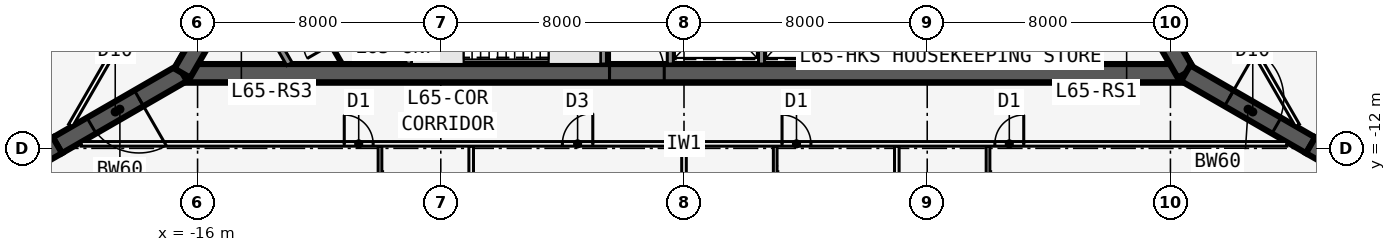
"""IFC4 building model, lengths in metres.
Left out: names, types, materials, properties, quantities, classifications, styles, units other than length and angle.
Written with IfcOpenShell. Run it as: python <this file> out.ifc"""

import sys

from ifc_helpers import new_model, si_unit, direction, frame, frame_2d, origin, place, context, subcontext, project, spatial, polyline, rectangle, outline, extrude, element, fill, save


model = new_model("IFC4")
c1 = context("Model", 3, precision=1e-05, world=origin(), true_north=direction((0.0, 1.0)))
c2 = subcontext(c1, "Body", "Model", "MODEL_VIEW")
j1 = project(units=[si_unit("LENGTHUNIT", "METRE"), si_unit("PLANEANGLEUNIT", "RADIAN")], contexts=[c1])
p1 = place(None, origin())
s1 = spatial("IfcSite", under=j1, at=p1, CompositionType="ELEMENT")
p2 = place(p1, origin())
s2 = spatial("IfcBuilding", under=s1, at=p2, CompositionType="ELEMENT")
p3 = place(p2, frame((0.0, 0.0, 246.5)))
s3 = spatial("IfcBuildingStorey", under=s2, at=p3, CompositionType="ELEMENT", Elevation=246.5)
p4 = place(p3, frame((-16.5, -9.526, 0.0), z_axis=(0.0, 0.0, 1.0), x_axis=(1.0, 0.0, 0.0)))
e1 = element("IfcWall", 1, at=p4, inside=s3, PredefinedType="SHEAR", context=c2, shape_type="SweptSolid", body=[
    extrude(rectangle(XDim=33.0, YDim=0.6, at=frame_2d((16.5, 0.0))), origin(), (0.0, 0.0, 1.0), 3.6),
])
p5 = place(p4, frame((14.05, 0.0, 0.0)))
e2 = element("IfcOpeningElement", 2, at=p5, cuts=e1, PredefinedType="OPENING", context=c2, shape_type="SweptSolid", body=[
    extrude(rectangle(XDim=1.8, YDim=2.13, at=frame_2d((0.9, 1.065))), frame((0.0, 0.31, 0.0), z_axis=(0.0, -1.0, 0.0), x_axis=(1.0, 0.0, 0.0)), (0.0, 0.0, 1.0), 0.62),
])
p6 = place(p3, frame((-9.05, -5.951, 0.0), z_axis=(0.0, 0.0, 1.0), x_axis=(0.0, -1.0, 0.0)))
e3 = element("IfcWall", 3, at=p6, inside=s3, PredefinedType="SOLIDWALL", context=c2, shape_type="SweptSolid", body=[
    extrude(rectangle(XDim=3.275, YDim=0.2, at=frame_2d((1.637, 0.0))), origin(), (0.0, 0.0, 1.0), 3.435),
])
p7 = place(p3, frame((-2.65, -5.951, 0.0), z_axis=(0.0, 0.0, 1.0), x_axis=(0.0, -1.0, 0.0)))
e4 = element("IfcWall", 4, at=p7, inside=s3, PredefinedType="SOLIDWALL", context=c2, shape_type="SweptSolid", body=[
    extrude(rectangle(XDim=3.275, YDim=0.2, at=frame_2d((1.637, 0.0))), origin(), (0.0, 0.0, 1.0), 3.435),
])
p8 = place(p7, frame((1.675, 0.0, 0.0)))
e5 = element("IfcOpeningElement", 5, at=p8, cuts=e4, PredefinedType="OPENING", context=c2, shape_type="SweptSolid", body=[
    extrude(rectangle(XDim=1.0, YDim=2.13, at=frame_2d((0.5, 1.065))), frame((0.0, 0.11, 0.0), z_axis=(0.0, -1.0, 0.0), x_axis=(1.0, 0.0, 0.0)), (0.0, 0.0, 1.0), 0.22),
])
for number, where, z_axis, x_axis in (
    (6, (-0.45, -5.951, 0.0), (0.0, 0.0, 1.0), (0.0, -1.0, 0.0)),
    (7, (2.55, -5.951, 0.0), (0.0, 0.0, 1.0), (0.0, -1.0, 0.0)),
    (8, (5.55, -5.951, 0.0), (0.0, 0.0, 1.0), (0.0, -1.0, 0.0)),
    (9, (8.45, -5.951, 0.0), (0.0, 0.0, 1.0), (0.0, -1.0, 0.0)),
):
    element("IfcWall", number, at=place(p3, frame(where, z_axis=z_axis, x_axis=x_axis)), inside=s3, PredefinedType="SOLIDWALL", context=c2, shape_type="SweptSolid", body=[
        extrude(rectangle(XDim=3.275, YDim=0.2, at=frame_2d((1.637, 0.0))), origin(), (0.0, 0.0, 1.0), 3.435),
    ])
p9 = place(p3, frame((16.5, -9.526, 0.0), z_axis=(0.0, 0.0, 1.0), x_axis=(-0.499999749417, 0.866025548458, 0.0)))
e10 = element("IfcWall", 10, at=p9, inside=s3, PredefinedType="SHEAR", context=c2, shape_type="SweptSolid", body=[
    extrude(rectangle(XDim=33.0, YDim=0.6, at=frame_2d((16.5, 0.0))), origin(), (0.0, 0.0, 1.0), 3.6),
])
p10 = place(p9, frame((14.15, 0.0, 0.0)))
e11 = element("IfcOpeningElement", 11, at=p10, cuts=e10, PredefinedType="OPENING", context=c2, shape_type="SweptSolid", body=[
    extrude(rectangle(XDim=1.8, YDim=2.13, at=frame_2d((0.9, 1.065))), frame((0.0, 0.31, 0.0), z_axis=(0.0, -1.0, 0.0), x_axis=(1.0, 0.0, 0.0)), (0.0, 0.0, 1.0), 0.62),
])
p11 = place(p9, frame((12.6, 0.0, 0.0)))
e12 = element("IfcOpeningElement", 12, at=p11, cuts=e10, PredefinedType="OPENING", context=c2, shape_type="SweptSolid", body=[
    extrude(rectangle(XDim=1.0, YDim=2.13, at=frame_2d((0.5, 1.065))), frame((0.0, 0.31, 0.0), z_axis=(0.0, -1.0, 0.0), x_axis=(1.0, 0.0, 0.0)), (0.0, 0.0, 1.0), 0.62),
])
p12 = place(p3, frame((0.0, 19.052, 0.0), z_axis=(0.0, 0.0, 1.0), x_axis=(-0.499999749417, -0.866025548458, 0.0)))
e13 = element("IfcWall", 13, at=p12, inside=s3, PredefinedType="SHEAR", context=c2, shape_type="SweptSolid", body=[
    extrude(rectangle(XDim=33.0, YDim=0.6, at=frame_2d((16.5, 0.0))), origin(), (0.0, 0.0, 1.0), 3.6),
])
p13 = place(p12, frame((14.15, 0.0, 0.0)))
e14 = element("IfcOpeningElement", 14, at=p13, cuts=e13, PredefinedType="OPENING", context=c2, shape_type="SweptSolid", body=[
    extrude(rectangle(XDim=1.8, YDim=2.13, at=frame_2d((0.9, 1.065))), frame((0.0, 0.31, 0.0), z_axis=(0.0, -1.0, 0.0), x_axis=(1.0, 0.0, 0.0)), (0.0, 0.0, 1.0), 0.62),
])
p14 = place(p12, frame((12.6, 0.0, 0.0)))
e15 = element("IfcOpeningElement", 15, at=p14, cuts=e13, PredefinedType="OPENING", context=c2, shape_type="SweptSolid", body=[
    extrude(rectangle(XDim=1.0, YDim=2.13, at=frame_2d((0.5, 1.065))), frame((0.0, 0.31, 0.0), z_axis=(0.0, -1.0, 0.0), x_axis=(1.0, 0.0, 0.0)), (0.0, 0.0, 1.0), 0.62),
])
p15 = place(p3, frame((16.5, -9.526, 0.0), z_axis=(0.0, 0.0, 1.0), x_axis=(0.866031398331, -0.499989616998, 0.0)))
e16 = element("IfcWall", 16, at=p15, inside=s3, PredefinedType="SHEAR", context=c2, shape_type="SweptSolid", body=[
    extrude(rectangle(XDim=4.746, YDim=0.6, at=frame_2d((2.373, 0.0))), origin(), (0.0, 0.0, 1.0), 3.6),
])
p16 = place(p15, frame((1.65, 0.0, 0.0)))
e17 = element("IfcOpeningElement", 17, at=p16, cuts=e16, PredefinedType="OPENING", context=c2, shape_type="SweptSolid", body=[
    extrude(rectangle(XDim=1.8, YDim=2.13, at=frame_2d((0.9, 1.065))), frame((0.0, 0.31, 0.0), z_axis=(0.0, -1.0, 0.0), x_axis=(1.0, 0.0, 0.0)), (0.0, 0.0, 1.0), 0.62),
])
p17 = place(p3, frame((20.61, -11.899, 0.0), z_axis=(0.0, 0.0, 1.0), x_axis=(0.866009537788, -0.500027479704, 0.0)))
e18 = element("IfcWall", 18, at=p17, inside=s3, PredefinedType="SHEAR", context=c2, shape_type="SweptSolid", body=[
    extrude(rectangle(XDim=1.155, YDim=0.6, at=frame_2d((0.577, 0.0))), origin(), (0.0, 0.0, 1.0), 3.6),
])
p18 = place(p3, frame((-16.5, -9.526, 0.0), z_axis=(0.0, 0.0, 1.0), x_axis=(-0.866031398331, -0.499989616998, 0.0)))
e19 = element("IfcWall", 19, at=p18, inside=s3, PredefinedType="SHEAR", context=c2, shape_type="SweptSolid", body=[
    extrude(rectangle(XDim=4.746, YDim=0.6, at=frame_2d((2.373, 0.0))), origin(), (0.0, 0.0, 1.0), 3.6),
])
p19 = place(p18, frame((1.65, 0.0, 0.0)))
e20 = element("IfcOpeningElement", 20, at=p19, cuts=e19, PredefinedType="OPENING", context=c2, shape_type="SweptSolid", body=[
    extrude(rectangle(XDim=1.8, YDim=2.13, at=frame_2d((0.9, 1.065))), frame((0.0, 0.31, 0.0), z_axis=(0.0, -1.0, 0.0), x_axis=(1.0, 0.0, 0.0)), (0.0, 0.0, 1.0), 0.62),
])
p20 = place(p3, frame((-20.61, -11.899, 0.0), z_axis=(0.0, 0.0, 1.0), x_axis=(-0.866009537788, -0.500027479704, 0.0)))
e21 = element("IfcWall", 21, at=p20, inside=s3, PredefinedType="SHEAR", context=c2, shape_type="SweptSolid", body=[
    extrude(rectangle(XDim=1.155, YDim=0.6, at=frame_2d((0.577, 0.0))), origin(), (0.0, 0.0, 1.0), 3.6),
])
p21 = place(p3, frame((18.46, -15.924, 0.0), z_axis=(0.0, 0.0, 1.0), x_axis=(0.707081252484, 0.707132308968, 0.0)))
e22 = element("IfcWall", 22, at=p21, inside=s3, PredefinedType="SOLIDWALL", context=c2, shape_type="SweptSolid", body=[
    extrude(outline(polyline([(4.782, 0.225), (4.723, 0.225), (4.375, 0.132), (4.351, 0.225), (0.0, 0.225), (0.0, -0.225), (4.782, -0.225), (4.782, 0.225)])), origin(), (0.0, 0.0, 1.0), 3.435),
])
p22 = place(p21, frame((0.75, 0.0, 0.45)))
e23 = element("IfcOpeningElement", 23, at=p22, cuts=e22, PredefinedType="OPENING", context=c2, shape_type="SweptSolid", body=[
    extrude(rectangle(XDim=3.0, YDim=2.6, at=frame_2d((1.5, 1.3))), frame((0.0, 0.235, 0.0), z_axis=(0.0, -1.0, 0.0), x_axis=(1.0, 0.0, 0.0)), (0.0, 0.0, 1.0), 0.47),
])
p23 = place(p3, frame((-21.841, -12.542, 0.0), z_axis=(0.0, 0.0, 1.0), x_axis=(0.707081252484, -0.707132308968, 0.0)))
e24 = element("IfcWall", 24, at=p23, inside=s3, PredefinedType="SOLIDWALL", context=c2, shape_type="SweptSolid", body=[
    extrude(outline(polyline([(4.782, 0.225), (0.431, 0.225), (0.406, 0.132), (0.059, 0.225), (0.0, 0.225), (0.0, -0.225), (4.782, -0.225), (4.782, 0.225)])), origin(), (0.0, 0.0, 1.0), 3.435),
])
p24 = place(p23, frame((1.031, 0.0, 0.45)))
e25 = element("IfcOpeningElement", 25, at=p24, cuts=e24, PredefinedType="OPENING", context=c2, shape_type="SweptSolid", body=[
    extrude(rectangle(XDim=3.0, YDim=2.6, at=frame_2d((1.5, 1.3))), frame((0.0, 0.235, 0.0), z_axis=(0.0, -1.0, 0.0), x_axis=(1.0, 0.0, 0.0)), (0.0, 0.0, 1.0), 0.47),
])
p25 = place(p3, frame((-19.827, -11.851, 0.0), z_axis=(0.0, 0.0, 1.0), x_axis=(1.0, 0.0, 0.0)))
e26 = element("IfcWall", 26, at=p25, inside=s3, PredefinedType="PARTITIONING", context=c2, shape_type="SweptSolid", body=[
    extrude(rectangle(XDim=39.654, YDim=0.15, at=frame_2d((19.827, 0.0))), origin(), (0.0, 0.0, 1.0), 3.435),
])
p26 = place(p25, frame((8.652, 0.0, 0.0)))
e27 = element("IfcOpeningElement", 27, at=p26, cuts=e26, PredefinedType="OPENING", context=c2, shape_type="SweptSolid", body=[
    extrude(rectangle(XDim=0.95, YDim=2.13, at=frame_2d((0.475, 1.065))), frame((0.0, 0.085, 0.0), z_axis=(0.0, -1.0, 0.0), x_axis=(1.0, 0.0, 0.0)), (0.0, 0.0, 1.0), 0.17),
])
p27 = place(p25, frame((15.827, 0.0, 0.0)))
e28 = element("IfcOpeningElement", 28, at=p27, cuts=e26, PredefinedType="OPENING", context=c2, shape_type="SweptSolid", body=[
    extrude(rectangle(XDim=1.0, YDim=2.13, at=frame_2d((0.5, 1.065))), frame((0.0, 0.085, 0.0), z_axis=(0.0, -1.0, 0.0), x_axis=(1.0, 0.0, 0.0)), (0.0, 0.0, 1.0), 0.17),
])
p28 = place(p25, frame((23.052, 0.0, 0.0)))
e29 = element("IfcOpeningElement", 29, at=p28, cuts=e26, PredefinedType="OPENING", context=c2, shape_type="SweptSolid", body=[
    extrude(rectangle(XDim=0.95, YDim=2.13, at=frame_2d((0.475, 1.065))), frame((0.0, 0.085, 0.0), z_axis=(0.0, -1.0, 0.0), x_axis=(1.0, 0.0, 0.0)), (0.0, 0.0, 1.0), 0.17),
])
p29 = place(p25, frame((30.052, 0.0, 0.0)))
e30 = element("IfcOpeningElement", 30, at=p29, cuts=e26, PredefinedType="OPENING", context=c2, shape_type="SweptSolid", body=[
    extrude(rectangle(XDim=0.95, YDim=2.13, at=frame_2d((0.475, 1.065))), frame((0.0, 0.085, 0.0), z_axis=(0.0, -1.0, 0.0), x_axis=(1.0, 0.0, 0.0)), (0.0, 0.0, 1.0), 0.17),
])
p30 = place(p3, frame((-7.0, -11.926, 0.0), z_axis=(0.0, 0.0, 1.0), x_axis=(0.0, -1.0, 0.0)))
e31 = element("IfcWall", 31, at=p30, inside=s3, PredefinedType="PARTITIONING", context=c2, shape_type="SweptSolid", body=[
    extrude(rectangle(XDim=6.609, YDim=0.15, at=frame_2d((3.304, 0.0))), origin(), (0.0, 0.0, 1.0), 2.678),
])
p31 = place(p3, frame((0.0, -11.926, 0.0), z_axis=(0.0, 0.0, 1.0), x_axis=(0.0, -1.0, 0.0)))
e32 = element("IfcWall", 32, at=p31, inside=s3, PredefinedType="PARTITIONING", context=c2, shape_type="SweptSolid", body=[
    extrude(rectangle(XDim=6.854, YDim=0.15, at=frame_2d((3.427, 0.0))), origin(), (0.0, 0.0, 1.0), 2.678),
])
p32 = place(p3, frame((7.0, -11.926, 0.0), z_axis=(0.0, 0.0, 1.0), x_axis=(0.0, -1.0, 0.0)))
e33 = element("IfcWall", 33, at=p32, inside=s3, PredefinedType="PARTITIONING", context=c2, shape_type="SweptSolid", body=[
    extrude(rectangle(XDim=6.609, YDim=0.15, at=frame_2d((3.304, 0.0))), origin(), (0.0, 0.0, 1.0), 2.678),
])
p33 = place(p3, frame((-10.0, -11.926, 0.0), z_axis=(0.0, 0.0, 1.0), x_axis=(0.0, -1.0, 0.0)))
e34 = element("IfcWall", 34, at=p33, inside=s3, PredefinedType="PLUMBINGWALL", context=c2, shape_type="SweptSolid", body=[
    extrude(rectangle(XDim=2.74, YDim=0.12, at=frame_2d((1.37, 0.0))), origin(), (0.0, 0.0, 1.0), 3.435),
])
p34 = place(p33, frame((1.55, 0.0, 0.0)))
e35 = element("IfcOpeningElement", 35, at=p34, cuts=e34, PredefinedType="OPENING", context=c2, shape_type="SweptSolid", body=[
    extrude(rectangle(XDim=0.9, YDim=2.13, at=frame_2d((0.45, 1.065))), frame((0.0, 0.07, 0.0), z_axis=(0.0, -1.0, 0.0), x_axis=(1.0, 0.0, 0.0)), (0.0, 0.0, 1.0), 0.14),
])
p35 = place(p3, frame((3.0, -11.926, 0.0), z_axis=(0.0, 0.0, 1.0), x_axis=(0.0, -1.0, 0.0)))
e36 = element("IfcWall", 36, at=p35, inside=s3, PredefinedType="PLUMBINGWALL", context=c2, shape_type="SweptSolid", body=[
    extrude(rectangle(XDim=2.74, YDim=0.12, at=frame_2d((1.37, 0.0))), origin(), (0.0, 0.0, 1.0), 3.435),
])
p36 = place(p35, frame((1.55, 0.0, 0.0)))
e37 = element("IfcOpeningElement", 37, at=p36, cuts=e36, PredefinedType="OPENING", context=c2, shape_type="SweptSolid", body=[
    extrude(rectangle(XDim=0.9, YDim=2.13, at=frame_2d((0.45, 1.065))), frame((0.0, 0.07, 0.0), z_axis=(0.0, -1.0, 0.0), x_axis=(1.0, 0.0, 0.0)), (0.0, 0.0, 1.0), 0.14),
])
p37 = place(p3, frame((10.0, -11.926, 0.0), z_axis=(0.0, 0.0, 1.0), x_axis=(0.0, -1.0, 0.0)))
e38 = element("IfcWall", 38, at=p37, inside=s3, PredefinedType="PLUMBINGWALL", context=c2, shape_type="SweptSolid", body=[
    extrude(rectangle(XDim=2.74, YDim=0.12, at=frame_2d((1.37, 0.0))), origin(), (0.0, 0.0, 1.0), 3.435),
])
p38 = place(p37, frame((1.55, 0.0, 0.0)))
e39 = element("IfcOpeningElement", 39, at=p38, cuts=e38, PredefinedType="OPENING", context=c2, shape_type="SweptSolid", body=[
    extrude(rectangle(XDim=0.9, YDim=2.13, at=frame_2d((0.45, 1.065))), frame((0.0, 0.07, 0.0), z_axis=(0.0, -1.0, 0.0), x_axis=(1.0, 0.0, 0.0)), (0.0, 0.0, 1.0), 0.14),
])
p39 = place(p3, frame((20.177, -11.245, 0.0), z_axis=(0.0, 0.0, 1.0), x_axis=(-0.49999979161, 0.866025524098, 0.0)))
e40 = element("IfcWall", 40, at=p39, inside=s3, PredefinedType="PARTITIONING", context=c2, shape_type="SweptSolid", body=[
    extrude(rectangle(XDim=12.827, YDim=0.15, at=frame_2d((6.414, 0.0))), origin(), (0.0, 0.0, 1.0), 3.435),
])
p40 = place(p39, frame((8.652, 0.0, 0.0)))
e41 = element("IfcOpeningElement", 41, at=p40, cuts=e40, PredefinedType="OPENING", context=c2, shape_type="SweptSolid", body=[
    extrude(rectangle(XDim=0.95, YDim=2.13, at=frame_2d((0.475, 1.065))), frame((0.0, 0.085, 0.0), z_axis=(0.0, -1.0, 0.0), x_axis=(1.0, 0.0, 0.0)), (0.0, 0.0, 1.0), 0.17),
])
p41 = place(p3, frame((-0.35, 23.096, 0.0), z_axis=(0.0, 0.0, 1.0), x_axis=(-0.499998875317, -0.866026053119, 0.0)))
e42 = element("IfcWall", 42, at=p41, inside=s3, PredefinedType="PARTITIONING", context=c2, shape_type="SweptSolid", body=[
    extrude(rectangle(XDim=39.654, YDim=0.15, at=frame_2d((19.827, 0.0))), origin(), (0.0, 0.0, 1.0), 3.435),
])
p42 = place(p41, frame((8.652, 0.0, 0.0)))
e43 = element("IfcOpeningElement", 43, at=p42, cuts=e42, PredefinedType="OPENING", context=c2, shape_type="SweptSolid", body=[
    extrude(rectangle(XDim=0.95, YDim=2.13, at=frame_2d((0.475, 1.065))), frame((0.0, 0.085, 0.0), z_axis=(0.0, -1.0, 0.0), x_axis=(1.0, 0.0, 0.0)), (0.0, 0.0, 1.0), 0.17),
])
p43 = place(p41, frame((16.052, 0.0, 0.0)))
e44 = element("IfcOpeningElement", 44, at=p43, cuts=e42, PredefinedType="OPENING", context=c2, shape_type="SweptSolid", body=[
    extrude(rectangle(XDim=0.95, YDim=2.13, at=frame_2d((0.475, 1.065))), frame((0.0, 0.085, 0.0), z_axis=(0.0, -1.0, 0.0), x_axis=(1.0, 0.0, 0.0)), (0.0, 0.0, 1.0), 0.17),
])
p44 = place(p41, frame((23.052, 0.0, 0.0)))
e45 = element("IfcOpeningElement", 45, at=p44, cuts=e42, PredefinedType="OPENING", context=c2, shape_type="SweptSolid", body=[
    extrude(rectangle(XDim=0.95, YDim=2.13, at=frame_2d((0.475, 1.065))), frame((0.0, 0.085, 0.0), z_axis=(0.0, -1.0, 0.0), x_axis=(1.0, 0.0, 0.0)), (0.0, 0.0, 1.0), 0.17),
])
p45 = place(p41, frame((30.052, 0.0, 0.0)))
e46 = element("IfcOpeningElement", 46, at=p45, cuts=e42, PredefinedType="OPENING", context=c2, shape_type="SweptSolid", body=[
    extrude(rectangle(XDim=0.95, YDim=2.13, at=frame_2d((0.475, 1.065))), frame((0.0, 0.085, 0.0), z_axis=(0.0, -1.0, 0.0), x_axis=(1.0, 0.0, 0.0)), (0.0, 0.0, 1.0), 0.17),
])
p46 = place(p3, frame((14.479, -6.626, 0.0), z_axis=(0.0, 0.0, 1.0), x_axis=(-0.499952404951, -0.866052881055, 0.0)))
e47 = element("IfcWall", 47, at=p46, inside=s3, PredefinedType="SOLIDWALL", context=c2, shape_type="SweptSolid", body=[
    extrude(rectangle(XDim=3.002, YDim=0.2, at=frame_2d((1.501, 0.0))), origin(), (0.0, 0.0, 1.0), 3.435),
])
p47 = place(p3, frame((13.094, -4.226, 0.0), z_axis=(0.0, 0.0, 1.0), x_axis=(-0.500027479704, -0.866009537788, 0.0)))
e48 = element("IfcWall", 48, at=p47, inside=s3, PredefinedType="PARTITIONING", context=c2, shape_type="SweptSolid", body=[
    extrude(rectangle(XDim=5.774, YDim=0.1, at=frame_2d((2.887, 0.0))), origin(), (0.0, 0.0, 1.0), 3.435),
])
p48 = place(p47, frame((2.437, 0.0, 0.0)))
e49 = element("IfcOpeningElement", 49, at=p48, cuts=e48, PredefinedType="OPENING", context=c2, shape_type="SweptSolid", body=[
    extrude(rectangle(XDim=0.9, YDim=2.13, at=frame_2d((0.45, 1.065))), frame((0.0, 0.06, 0.0), z_axis=(0.0, -1.0, 0.0), x_axis=(1.0, 0.0, 0.0)), (0.0, 0.0, 1.0), 0.12),
])
p49 = place(p3, frame((-12.978, -9.226, 0.0), z_axis=(0.0, 0.0, 1.0), x_axis=(-0.499952404951, 0.866052881055, 0.0)))
e50 = element("IfcWall", 50, at=p49, inside=s3, PredefinedType="SOLIDWALL", context=c2, shape_type="SweptSolid", body=[
    extrude(rectangle(XDim=3.002, YDim=0.2, at=frame_2d((1.501, 0.0))), origin(), (0.0, 0.0, 1.0), 3.435),
])
p50 = place(p3, frame((-11.246, -9.226, 0.0), z_axis=(0.0, 0.0, 1.0), x_axis=(-0.499999210213, 0.866025859768, 0.0)))
e51 = element("IfcWall", 51, at=p50, inside=s3, PredefinedType="PARTITIONING", context=c2, shape_type="SweptSolid", body=[
    extrude(rectangle(XDim=4.734, YDim=0.1, at=frame_2d((2.367, 0.0))), origin(), (0.0, 0.0, 1.0), 3.435),
])
p51 = place(p50, frame((0.734, 0.0, 0.0)))
e52 = element("IfcOpeningElement", 52, at=p51, cuts=e51, PredefinedType="OPENING", context=c2, shape_type="SweptSolid", body=[
    extrude(rectangle(XDim=0.9, YDim=2.13, at=frame_2d((0.45, 1.065))), frame((0.0, 0.06, 0.0), z_axis=(0.0, -1.0, 0.0), x_axis=(1.0, 0.0, 0.0)), (0.0, 0.0, 1.0), 0.12),
])
p52 = place(p26, origin())
e53 = element("IfcDoor", 53, at=p52, inside=s3, OperationType="SINGLE_SWING_LEFT", PredefinedType="DOOR", context=c2, shape_type="SweptSolid", body=[
    extrude(rectangle(XDim=0.95, YDim=2.13, at=frame_2d((0.475, 1.065))), frame((0.0, 0.025, 0.0), z_axis=(0.0, -1.0, 0.0), x_axis=(1.0, 0.0, 0.0)), (0.0, 0.0, 1.0), 0.05),
])
fill(e27, e53)
p53 = place(p27, origin())
e54 = element("IfcDoor", 54, at=p53, inside=s3, OperationType="SINGLE_SWING_RIGHT", PredefinedType="DOOR", context=c2, shape_type="SweptSolid", body=[
    extrude(rectangle(XDim=1.0, YDim=2.13, at=frame_2d((0.5, 1.065))), frame((0.0, 0.025, 0.0), z_axis=(0.0, -1.0, 0.0), x_axis=(1.0, 0.0, 0.0)), (0.0, 0.0, 1.0), 0.05),
])
fill(e28, e54)
p54 = place(p28, origin())
e55 = element("IfcDoor", 55, at=p54, inside=s3, OperationType="SINGLE_SWING_LEFT", PredefinedType="DOOR", context=c2, shape_type="SweptSolid", body=[
    extrude(rectangle(XDim=0.95, YDim=2.13, at=frame_2d((0.475, 1.065))), frame((0.0, 0.025, 0.0), z_axis=(0.0, -1.0, 0.0), x_axis=(1.0, 0.0, 0.0)), (0.0, 0.0, 1.0), 0.05),
])
fill(e29, e55)
p55 = place(p29, origin())
e56 = element("IfcDoor", 56, at=p55, inside=s3, OperationType="SINGLE_SWING_RIGHT", PredefinedType="DOOR", context=c2, shape_type="SweptSolid", body=[
    extrude(rectangle(XDim=0.95, YDim=2.13, at=frame_2d((0.475, 1.065))), frame((0.0, 0.025, 0.0), z_axis=(0.0, -1.0, 0.0), x_axis=(1.0, 0.0, 0.0)), (0.0, 0.0, 1.0), 0.05),
])
fill(e30, e56)
p56 = place(p5, origin())
e57 = element("IfcDoor", 57, at=p56, inside=s3, OperationType="DOUBLE_DOOR_SINGLE_SWING", PredefinedType="DOOR", context=c2, shape_type="SweptSolid", body=[
    extrude(rectangle(XDim=1.8, YDim=2.13, at=frame_2d((0.9, 1.065))), frame((0.0, 0.025, 0.0), z_axis=(0.0, -1.0, 0.0), x_axis=(1.0, 0.0, 0.0)), (0.0, 0.0, 1.0), 0.05),
])
fill(e2, e57)
p57 = place(p16, origin())
e58 = element("IfcDoor", 58, at=p57, inside=s3, OperationType="DOUBLE_DOOR_DOUBLE_SWING", PredefinedType="DOOR", context=c2, shape_type="SweptSolid", body=[
    extrude(rectangle(XDim=1.8, YDim=2.13, at=frame_2d((0.9, 1.065))), frame((0.0, 0.025, 0.0), z_axis=(0.0, -1.0, 0.0), x_axis=(1.0, 0.0, 0.0)), (0.0, 0.0, 1.0), 0.05),
])
fill(e17, e58)
p58 = place(p19, origin())
e59 = element("IfcDoor", 59, at=p58, inside=s3, OperationType="DOUBLE_DOOR_DOUBLE_SWING", PredefinedType="DOOR", context=c2, shape_type="SweptSolid", body=[
    extrude(rectangle(XDim=1.8, YDim=2.13, at=frame_2d((0.9, 1.065))), frame((0.0, 0.025, 0.0), z_axis=(0.0, -1.0, 0.0), x_axis=(1.0, 0.0, 0.0)), (0.0, 0.0, 1.0), 0.05),
])
fill(e20, e59)
save(model, sys.argv[1])
